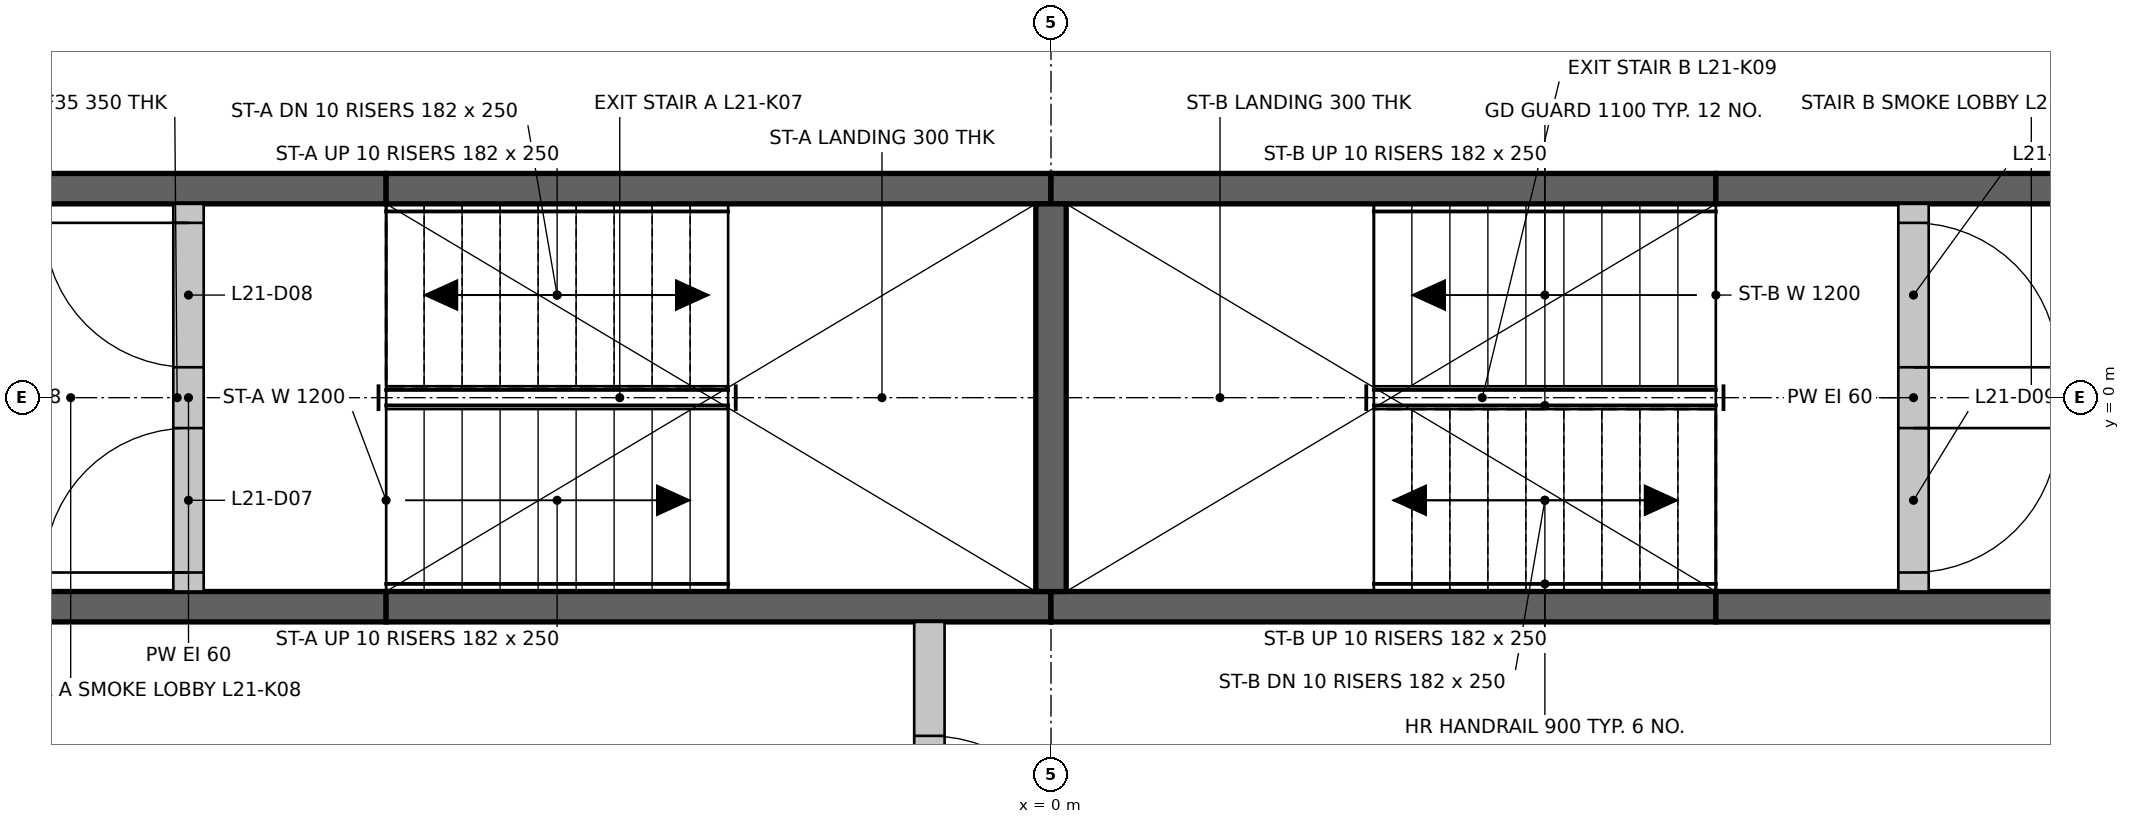
"""IFC4 building model, lengths in metres.
Left out: names, types, materials, properties, quantities, classifications, styles, units other than length and angle.
Written with IfcOpenShell. Run it as: python <this file> out.ifc"""

import sys

from ifc_helpers import new_model, si_unit, direction, frame, frame_2d, origin, place, context, subcontext, project, spatial, rectangle, extrude, element, fill, save


model = new_model("IFC4")
c1 = context("Model", 3, precision=1e-05, world=origin(), true_north=direction((0.0, 1.0)))
c2 = subcontext(c1, "Body", "Model", "MODEL_VIEW")
j1 = project(units=[si_unit("LENGTHUNIT", "METRE"), si_unit("PLANEANGLEUNIT", "RADIAN")], contexts=[c1])
p1 = place(None, origin())
s1 = spatial("IfcSite", under=j1, at=p1, CompositionType="ELEMENT")
p2 = place(p1, origin())
s2 = spatial("IfcBuilding", under=s1, at=p2, CompositionType="ELEMENT")
p3 = place(p2, frame((0.0, 0.0, 91.0)))
s3 = spatial("IfcBuildingStorey", under=s2, at=p3, CompositionType="ELEMENT", Elevation=91.0)
p4 = place(p3, frame((-7.124, -1.375, 0.0), z_axis=(0.0, 0.0, 1.0), x_axis=(1.0, 0.0, 0.0)))
e1 = element("IfcWall", 1, at=p4, inside=s3, PredefinedType="SHEAR", context=c2, shape_type="SweptSolid", body=[
    extrude(rectangle(XDim=2.75, YDim=0.2, at=frame_2d((1.375, 0.0))), origin(), (0.0, 0.0, 1.0), 3.3),
])
for number, where, z_axis, x_axis in (
    (2, (-4.374, -1.375, 0.0), (0.0, 0.0, 1.0), (1.0, 0.0, 0.0)),
    (3, (0.0, -1.375, 0.0), (0.0, 0.0, 1.0), (1.0, 0.0, 0.0)),
):
    element("IfcWall", number, at=place(p3, frame(where, z_axis=z_axis, x_axis=x_axis)), inside=s3, PredefinedType="SHEAR", context=c2, shape_type="SweptSolid", body=[
        extrude(rectangle(XDim=4.374, YDim=0.2, at=frame_2d((2.187, 0.0))), origin(), (0.0, 0.0, 1.0), 3.3),
    ])
for number, where, z_axis, x_axis in (
    (4, (4.374, -1.375, 0.0), (0.0, 0.0, 1.0), (1.0, 0.0, 0.0)),
    (5, (-7.124, 1.375, 0.0), (0.0, 0.0, 1.0), (1.0, 0.0, 0.0)),
):
    element("IfcWall", number, at=place(p3, frame(where, z_axis=z_axis, x_axis=x_axis)), inside=s3, PredefinedType="SHEAR", context=c2, shape_type="SweptSolid", body=[
        extrude(rectangle(XDim=2.75, YDim=0.2, at=frame_2d((1.375, 0.0))), origin(), (0.0, 0.0, 1.0), 3.3),
    ])
for number, where, z_axis, x_axis in (
    (6, (-4.374, 1.375, 0.0), (0.0, 0.0, 1.0), (1.0, 0.0, 0.0)),
    (7, (0.0, 1.375, 0.0), (0.0, 0.0, 1.0), (1.0, 0.0, 0.0)),
):
    element("IfcWall", number, at=place(p3, frame(where, z_axis=z_axis, x_axis=x_axis)), inside=s3, PredefinedType="SHEAR", context=c2, shape_type="SweptSolid", body=[
        extrude(rectangle(XDim=4.374, YDim=0.2, at=frame_2d((2.187, 0.0))), origin(), (0.0, 0.0, 1.0), 3.3),
    ])
p5 = place(p3, frame((4.374, 1.375, 0.0), z_axis=(0.0, 0.0, 1.0), x_axis=(1.0, 0.0, 0.0)))
e8 = element("IfcWall", 8, at=p5, inside=s3, PredefinedType="SHEAR", context=c2, shape_type="SweptSolid", body=[
    extrude(rectangle(XDim=2.75, YDim=0.2, at=frame_2d((1.375, 0.0))), origin(), (0.0, 0.0, 1.0), 3.3),
])
p6 = place(p3, frame((0.0, -1.275, 0.0), z_axis=(0.0, 0.0, 1.0), x_axis=(0.0, 1.0, 0.0)))
e9 = element("IfcWall", 9, at=p6, inside=s3, PredefinedType="SHEAR", context=c2, shape_type="SweptSolid", body=[
    extrude(rectangle(XDim=2.55, YDim=0.2, at=frame_2d((1.275, 0.0))), origin(), (0.0, 0.0, 1.0), 3.3),
])
p7 = place(p3, frame((-0.8, -3.974, 0.0), z_axis=(0.0, 0.0, 1.0), x_axis=(0.0, 1.0, 0.0)))
e10 = element("IfcWall", 10, at=p7, inside=s3, PredefinedType="PARTITIONING", context=c2, shape_type="SweptSolid", body=[
    extrude(rectangle(XDim=2.499, YDim=0.2, at=frame_2d((1.25, 0.0))), origin(), (0.0, 0.0, 1.0), 3.3),
])
p8 = place(p7, frame((0.75, 0.0, 0.0)))
e11 = element("IfcOpeningElement", 11, at=p8, cuts=e10, PredefinedType="OPENING", context=c2, shape_type="SweptSolid", body=[
    extrude(rectangle(XDim=1.0, YDim=2.1, at=frame_2d((0.5, 1.05))), frame((0.0, 0.11, 0.0), z_axis=(0.0, -1.0, 0.0), x_axis=(1.0, 0.0, 0.0)), (0.0, 0.0, 1.0), 0.22),
])
p9 = place(p3, frame((-5.674, -1.275, 0.0), z_axis=(0.0, 0.0, 1.0), x_axis=(0.0, 1.0, 0.0)))
e12 = element("IfcWall", 12, at=p9, inside=s3, PredefinedType="PARTITIONING", context=c2, shape_type="SweptSolid", body=[
    extrude(rectangle(XDim=2.55, YDim=0.2, at=frame_2d((1.275, 0.0))), origin(), (0.0, 0.0, 1.0), 3.3),
])
p10 = place(p9, frame((0.125, 0.0, 0.0)))
e13 = element("IfcOpeningElement", 13, at=p10, cuts=e12, PredefinedType="OPENING", context=c2, shape_type="SweptSolid", body=[
    extrude(rectangle(XDim=0.95, YDim=2.1, at=frame_2d((0.475, 1.05))), frame((0.0, 0.11, 0.0), z_axis=(0.0, -1.0, 0.0), x_axis=(1.0, 0.0, 0.0)), (0.0, 0.0, 1.0), 0.22),
])
p11 = place(p9, frame((1.475, 0.0, 0.0)))
e14 = element("IfcOpeningElement", 14, at=p11, cuts=e12, PredefinedType="OPENING", context=c2, shape_type="SweptSolid", body=[
    extrude(rectangle(XDim=0.95, YDim=2.1, at=frame_2d((0.475, 1.05))), frame((0.0, 0.11, 0.0), z_axis=(0.0, -1.0, 0.0), x_axis=(1.0, 0.0, 0.0)), (0.0, 0.0, 1.0), 0.22),
])
p12 = place(p3, frame((5.674, -1.275, 0.0), z_axis=(0.0, 0.0, 1.0), x_axis=(0.0, 1.0, 0.0)))
e15 = element("IfcWall", 15, at=p12, inside=s3, PredefinedType="PARTITIONING", context=c2, shape_type="SweptSolid", body=[
    extrude(rectangle(XDim=2.55, YDim=0.2, at=frame_2d((1.275, 0.0))), origin(), (0.0, 0.0, 1.0), 3.3),
])
p13 = place(p12, frame((0.125, 0.0, 0.0)))
e16 = element("IfcOpeningElement", 16, at=p13, cuts=e15, PredefinedType="OPENING", context=c2, shape_type="SweptSolid", body=[
    extrude(rectangle(XDim=0.95, YDim=2.1, at=frame_2d((0.475, 1.05))), frame((0.0, 0.11, 0.0), z_axis=(0.0, -1.0, 0.0), x_axis=(1.0, 0.0, 0.0)), (0.0, 0.0, 1.0), 0.22),
])
p14 = place(p12, frame((1.475, 0.0, 0.0)))
e17 = element("IfcOpeningElement", 17, at=p14, cuts=e15, PredefinedType="OPENING", context=c2, shape_type="SweptSolid", body=[
    extrude(rectangle(XDim=0.95, YDim=2.1, at=frame_2d((0.475, 1.05))), frame((0.0, 0.11, 0.0), z_axis=(0.0, -1.0, 0.0), x_axis=(1.0, 0.0, 0.0)), (0.0, 0.0, 1.0), 0.22),
])
p15 = place(p10, origin())
e18 = element("IfcDoor", 18, at=p15, inside=s3, OperationType="SINGLE_SWING_LEFT", PredefinedType="DOOR", context=c2, shape_type="SweptSolid", body=[
    extrude(rectangle(XDim=0.95, YDim=2.1, at=frame_2d((0.475, 1.05))), frame((0.0, 0.025, 0.0), z_axis=(0.0, -1.0, 0.0), x_axis=(1.0, 0.0, 0.0)), (0.0, 0.0, 1.0), 0.05),
])
fill(e13, e18)
p16 = place(p11, origin())
e19 = element("IfcDoor", 19, at=p16, inside=s3, OperationType="SINGLE_SWING_RIGHT", PredefinedType="DOOR", context=c2, shape_type="SweptSolid", body=[
    extrude(rectangle(XDim=0.95, YDim=2.1, at=frame_2d((0.475, 1.05))), frame((0.0, 0.025, 0.0), z_axis=(0.0, -1.0, 0.0), x_axis=(1.0, 0.0, 0.0)), (0.0, 0.0, 1.0), 0.05),
])
fill(e14, e19)
p17 = place(p13, frame((0.95, 0.0, 0.0), z_axis=(0.0, 0.0, 1.0), x_axis=(-1.0, 0.0, 0.0)))
e20 = element("IfcDoor", 20, at=p17, inside=s3, OperationType="SINGLE_SWING_RIGHT", PredefinedType="DOOR", context=c2, shape_type="SweptSolid", body=[
    extrude(rectangle(XDim=0.95, YDim=2.1, at=frame_2d((0.475, 1.05))), frame((0.0, 0.025, 0.0), z_axis=(0.0, -1.0, 0.0), x_axis=(1.0, 0.0, 0.0)), (0.0, 0.0, 1.0), 0.05),
])
fill(e16, e20)
p18 = place(p14, frame((0.95, 0.0, 0.0), z_axis=(0.0, 0.0, 1.0), x_axis=(-1.0, 0.0, 0.0)))
e21 = element("IfcDoor", 21, at=p18, inside=s3, OperationType="SINGLE_SWING_LEFT", PredefinedType="DOOR", context=c2, shape_type="SweptSolid", body=[
    extrude(rectangle(XDim=0.95, YDim=2.1, at=frame_2d((0.475, 1.05))), frame((0.0, 0.025, 0.0), z_axis=(0.0, -1.0, 0.0), x_axis=(1.0, 0.0, 0.0)), (0.0, 0.0, 1.0), 0.05),
])
fill(e17, e21)
p19 = place(p8, frame((1.0, 0.0, 0.0), z_axis=(0.0, 0.0, 1.0), x_axis=(-1.0, 0.0, 0.0)))
e22 = element("IfcDoor", 22, at=p19, inside=s3, OperationType="SINGLE_SWING_LEFT", PredefinedType="DOOR", context=c2, shape_type="SweptSolid", body=[
    extrude(rectangle(XDim=1.0, YDim=2.1, at=frame_2d((0.5, 1.05))), frame((0.0, 0.025, 0.0), z_axis=(0.0, -1.0, 0.0), x_axis=(1.0, 0.0, 0.0)), (0.0, 0.0, 1.0), 0.05),
])
fill(e11, e22)
save(model, sys.argv[1])
